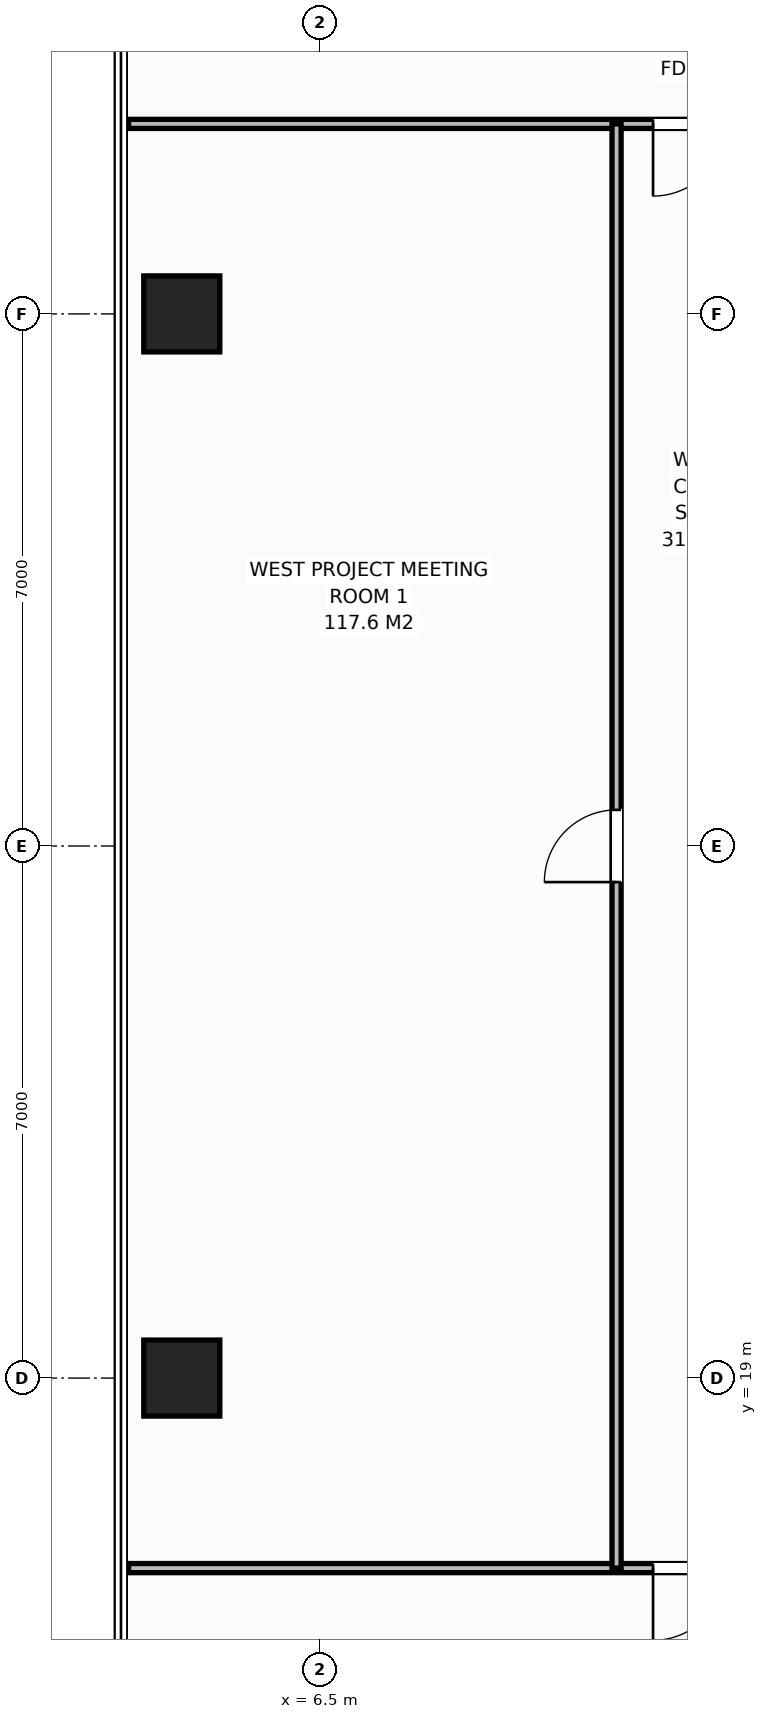
"""IFC4 building model, lengths in metres.
Left out: names, types, materials, properties, quantities, classifications, styles, units other than length and angle.
Written with IfcOpenShell. Run it as: python <this file> out.ifc"""

import sys

from ifc_helpers import new_model, si_unit, direction, frame, frame_2d, origin, origin_2d, place, context, subcontext, project, spatial, rectangle, extrude, element, fill, save


model = new_model("IFC4")
c1 = context("Model", 3, precision=1e-05, world=origin(), true_north=direction((0.0, 1.0)))
c2 = subcontext(c1, "Body", "Model", "MODEL_VIEW")
j1 = project(units=[si_unit("LENGTHUNIT", "METRE"), si_unit("PLANEANGLEUNIT", "RADIAN")], contexts=[c1])
p1 = place(None, origin())
s1 = spatial("IfcSite", under=j1, at=p1, CompositionType="ELEMENT")
p2 = place(p1, origin())
s2 = spatial("IfcBuilding", under=s1, at=p2, CompositionType="ELEMENT")
p3 = place(p2, frame((0.0, 0.0, 167.0)))
s3 = spatial("IfcBuildingStorey", under=s2, at=p3, CompositionType="ELEMENT", Elevation=167.0)
for number, where, z_axis, x_axis in (
    (1, (4.68, 19.0, 0.0), (0.0, 0.0, 1.0), (1.0, 0.0, 0.0)),
    (2, (4.68, 33.0, 0.0), (0.0, 0.0, 1.0), (1.0, 0.0, 0.0)),
):
    element("IfcColumn", number, at=place(p3, frame(where, z_axis=z_axis, x_axis=x_axis)), inside=s3, PredefinedType="COLUMN", context=c2, shape_type="SweptSolid", body=[
        extrude(rectangle(XDim=1.0, YDim=1.0, at=origin_2d()), origin(), (0.0, 0.0, 1.0), 3.8),
    ])
p4 = place(p3, frame((3.98, 35.5, 0.0), z_axis=(0.0, 0.0, 1.0), x_axis=(1.0, 0.0, 0.0)))
e3 = element("IfcWall", 3, at=p4, inside=s3, PredefinedType="PARTITIONING", context=c2, shape_type="SweptSolid", body=[
    extrude(rectangle(XDim=11.215, YDim=0.12, at=frame_2d((5.607, 0.0))), origin(), (0.0, 0.0, 1.0), 3.572),
])
p5 = place(p4, frame((6.9, 0.0, 0.0)))
e4 = element("IfcOpeningElement", 4, at=p5, cuts=e3, PredefinedType="OPENING", context=c2, shape_type="SweptSolid", body=[
    extrude(rectangle(XDim=0.95, YDim=2.15, at=frame_2d((0.475, 1.075))), frame((0.0, 0.07, 0.0), z_axis=(0.0, -1.0, 0.0), x_axis=(1.0, 0.0, 0.0)), (0.0, 0.0, 1.0), 0.14),
])
p6 = place(p3, frame((3.98, 16.5, 0.0), z_axis=(0.0, 0.0, 1.0), x_axis=(1.0, 0.0, 0.0)))
e5 = element("IfcWall", 5, at=p6, inside=s3, PredefinedType="PARTITIONING", context=c2, shape_type="SweptSolid", body=[
    extrude(rectangle(XDim=10.32, YDim=0.12, at=frame_2d((5.16, 0.0))), origin(), (0.0, 0.0, 1.0), 3.572),
])
p7 = place(p6, frame((6.9, 0.0, 0.0)))
e6 = element("IfcOpeningElement", 6, at=p7, cuts=e5, PredefinedType="OPENING", context=c2, shape_type="SweptSolid", body=[
    extrude(rectangle(XDim=0.95, YDim=2.15, at=frame_2d((0.475, 1.075))), frame((0.0, 0.07, 0.0), z_axis=(0.0, -1.0, 0.0), x_axis=(1.0, 0.0, 0.0)), (0.0, 0.0, 1.0), 0.14),
])
p8 = place(p3, frame((10.4, 16.5, 0.0), z_axis=(0.0, 0.0, 1.0), x_axis=(0.0, 1.0, 0.0)))
e7 = element("IfcWall", 7, at=p8, inside=s3, PredefinedType="PARTITIONING", context=c2, shape_type="SweptSolid", body=[
    extrude(rectangle(XDim=19.0, YDim=0.12, at=frame_2d((9.5, 0.0))), origin(), (0.0, 0.0, 1.0), 3.572),
])
p9 = place(p8, frame((9.025, 0.0, 0.0)))
e8 = element("IfcOpeningElement", 8, at=p9, cuts=e7, PredefinedType="OPENING", context=c2, shape_type="SweptSolid", body=[
    extrude(rectangle(XDim=0.95, YDim=2.15, at=frame_2d((0.475, 1.075))), frame((0.0, 0.07, 0.0), z_axis=(0.0, -1.0, 0.0), x_axis=(1.0, 0.0, 0.0)), (0.0, 0.0, 1.0), 0.14),
])
p10 = place(p5, origin())
e9 = element("IfcDoor", 9, at=p10, inside=s3, OperationType="SINGLE_SWING_RIGHT", PredefinedType="DOOR", context=c2, shape_type="SweptSolid", body=[
    extrude(rectangle(XDim=0.95, YDim=2.15, at=frame_2d((0.475, 1.075))), frame((0.0, 0.025, 0.0), z_axis=(0.0, -1.0, 0.0), x_axis=(1.0, 0.0, 0.0)), (0.0, 0.0, 1.0), 0.05),
])
fill(e4, e9)
p11 = place(p7, origin())
e10 = element("IfcDoor", 10, at=p11, inside=s3, OperationType="SINGLE_SWING_RIGHT", PredefinedType="DOOR", context=c2, shape_type="SweptSolid", body=[
    extrude(rectangle(XDim=0.95, YDim=2.15, at=frame_2d((0.475, 1.075))), frame((0.0, 0.025, 0.0), z_axis=(0.0, -1.0, 0.0), x_axis=(1.0, 0.0, 0.0)), (0.0, 0.0, 1.0), 0.05),
])
fill(e6, e10)
p12 = place(p9, origin())
e11 = element("IfcDoor", 11, at=p12, inside=s3, OperationType="SINGLE_SWING_LEFT", PredefinedType="DOOR", context=c2, shape_type="SweptSolid", body=[
    extrude(rectangle(XDim=0.95, YDim=2.15, at=frame_2d((0.475, 1.075))), frame((0.0, 0.025, 0.0), z_axis=(0.0, -1.0, 0.0), x_axis=(1.0, 0.0, 0.0)), (0.0, 0.0, 1.0), 0.05),
])
fill(e8, e11)
save(model, sys.argv[1])
